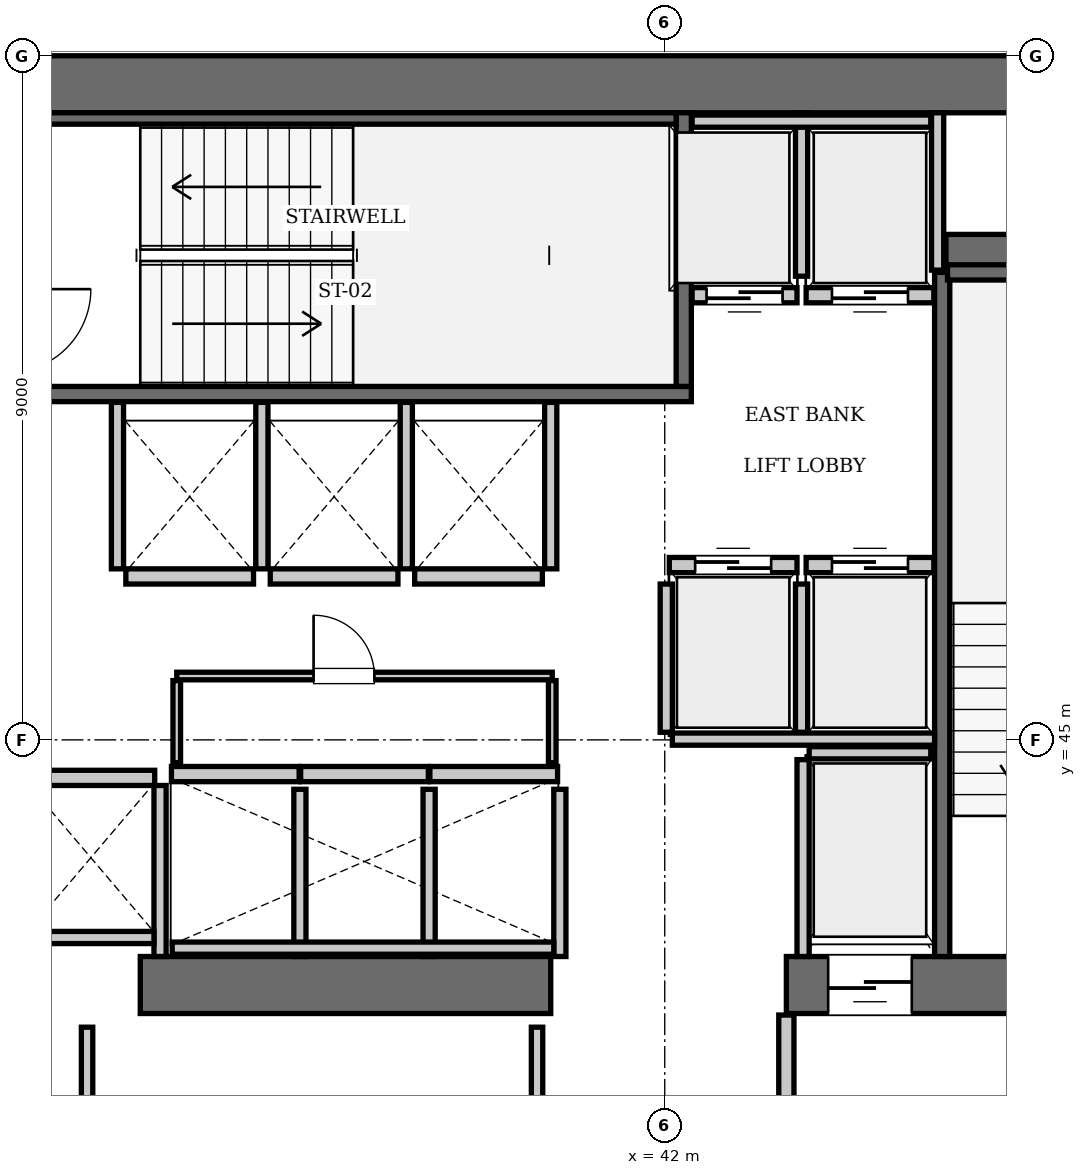
"""IFC4 building model, lengths in metres.
Left out: names, types, materials, properties, quantities, classifications, styles, units other than length and angle.
Written with IfcOpenShell. Run it as: python <this file> out.ifc"""

import sys

from ifc_helpers import new_model, si_unit, direction, frame, frame_2d, origin, place, context, subcontext, project, spatial, rectangle, extrude, element, fill, save


model = new_model("IFC4")
c1 = context("Model", 3, precision=1e-05, world=origin(), true_north=direction((0.0, 1.0)))
c2 = subcontext(c1, "Body", "Model", "MODEL_VIEW")
j1 = project(units=[si_unit("LENGTHUNIT", "METRE"), si_unit("PLANEANGLEUNIT", "RADIAN")], contexts=[c1])
p1 = place(None, origin())
s1 = spatial("IfcSite", under=j1, at=p1, CompositionType="ELEMENT")
p2 = place(p1, origin())
s2 = spatial("IfcBuilding", under=s1, at=p2, CompositionType="ELEMENT")
p3 = place(p2, frame((0.0, 0.0, 150.5)))
s3 = spatial("IfcBuildingStorey", under=s2, at=p3, CompositionType="ELEMENT", Elevation=150.5)
p4 = place(p3, frame((25.2, 53.625, 0.0), z_axis=(0.0, 0.0, 1.0), x_axis=(1.0, 0.0, 0.0)))
e1 = element("IfcWall", 1, at=p4, inside=s3, PredefinedType="SHEAR", context=c2, shape_type="SweptSolid", body=[
    extrude(rectangle(XDim=25.2, YDim=0.75, at=frame_2d((12.6, 0.0))), origin(), (0.0, 0.0, 1.0), 3.85),
])
p5 = place(p3, frame((35.1, 41.775, 0.0), z_axis=(0.0, 0.0, 1.0), x_axis=(1.0, 0.0, 0.0)))
e2 = element("IfcWall", 2, at=p5, inside=s3, PredefinedType="SHEAR", context=c2, shape_type="SweptSolid", body=[
    extrude(rectangle(XDim=5.4, YDim=0.75, at=frame_2d((2.7, 0.0))), origin(), (0.0, 0.0, 1.0), 3.85),
])
p6 = place(p3, frame((43.6, 41.775, 0.0), z_axis=(0.0, 0.0, 1.0), x_axis=(1.0, 0.0, 0.0)))
e3 = element("IfcWall", 3, at=p6, inside=s3, PredefinedType="SHEAR", context=c2, shape_type="SweptSolid", body=[
    extrude(rectangle(XDim=6.8, YDim=0.75, at=frame_2d((3.4, 0.0))), origin(), (0.0, 0.0, 1.0), 3.85),
])
p7 = place(p6, frame((3.9, 0.0, 0.0)))
e4 = element("IfcOpeningElement", 4, at=p7, cuts=e3, PredefinedType="OPENING", context=c2, shape_type="SweptSolid", body=[
    extrude(rectangle(XDim=1.15, YDim=2.15, at=frame_2d((0.575, 1.075))), frame((0.0, 0.385, 0.0), z_axis=(0.0, -1.0, 0.0), x_axis=(1.0, 0.0, 0.0)), (0.0, 0.0, 1.0), 0.77),
])
p8 = place(p6, frame((0.55, 0.0, 0.0)))
e5 = element("IfcOpeningElement", 5, at=p8, cuts=e3, PredefinedType="OPENING", context=c2, shape_type="SweptSolid", body=[
    extrude(rectangle(XDim=1.1, YDim=2.2, at=frame_2d((0.55, 1.1))), frame((0.0, 0.385, 0.0), z_axis=(0.0, -1.0, 0.0), x_axis=(1.0, 0.0, 0.0)), (0.0, 0.0, 1.0), 0.77),
])
p9 = place(p3, frame((45.7, 51.4, 0.0), z_axis=(0.0, 0.0, 1.0), x_axis=(1.0, 0.0, 0.0)))
e6 = element("IfcWall", 6, at=p9, inside=s3, PredefinedType="SHEAR", context=c2, shape_type="SweptSolid", body=[
    extrude(rectangle(XDim=3.95, YDim=0.5, at=frame_2d((1.975, 0.0))), origin(), (0.0, 0.0, 1.0), 3.85),
])
p10 = place(p3, frame((33.25, 49.55, 0.0), z_axis=(0.0, 0.0, 1.0), x_axis=(1.0, 0.0, 0.0)))
e7 = element("IfcWall", 7, at=p10, inside=s3, PredefinedType="SOLIDWALL", context=c2, shape_type="SweptSolid", body=[
    extrude(rectangle(XDim=9.1, YDim=0.2, at=frame_2d((4.55, 0.0))), origin(), (0.0, 0.0, 1.0), 3.61),
])
p11 = place(p3, frame((42.25, 49.65, 0.0), z_axis=(0.0, 0.0, 1.0), x_axis=(0.0, 1.0, 0.0)))
e8 = element("IfcWall", 8, at=p11, inside=s3, PredefinedType="SOLIDWALL", context=c2, shape_type="SweptSolid", body=[
    extrude(rectangle(XDim=3.6, YDim=0.2, at=frame_2d((1.8, 0.0))), origin(), (0.0, 0.0, 1.0), 3.61),
])
p12 = place(p3, frame((33.45, 53.175, 0.0), z_axis=(0.0, 0.0, 1.0), x_axis=(1.0, 0.0, 0.0)))
e9 = element("IfcWall", 9, at=p12, inside=s3, PredefinedType="SOLIDWALL", context=c2, shape_type="SweptSolid", body=[
    extrude(rectangle(XDim=8.7, YDim=0.15, at=frame_2d((4.35, 0.0))), origin(), (0.0, 0.0, 1.0), 3.61),
])
p13 = place(p3, frame((45.65, 42.15, 0.0), z_axis=(0.0, 0.0, 1.0), x_axis=(0.0, 1.0, 0.0)))
e10 = element("IfcWall", 10, at=p13, inside=s3, PredefinedType="SOLIDWALL", context=c2, shape_type="SweptSolid", body=[
    extrude(rectangle(XDim=9.0, YDim=0.2, at=frame_2d((4.5, 0.0))), origin(), (0.0, 0.0, 1.0), 3.61),
])
p14 = place(p3, frame((45.72, 51.15, 0.0), z_axis=(0.0, 0.0, 1.0), x_axis=(1.0, 0.0, 0.0)))
e11 = element("IfcWall", 11, at=p14, inside=s3, PredefinedType="SOLIDWALL", context=c2, shape_type="SweptSolid", body=[
    extrude(rectangle(XDim=3.5, YDim=0.2, at=frame_2d((1.75, 0.0))), origin(), (0.0, 0.0, 1.0), 3.61),
])
p15 = place(p3, frame((42.06, 47.3, 0.0), z_axis=(0.0, 0.0, 1.0), x_axis=(1.0, 0.0, 0.0)))
e12 = element("IfcWall", 12, at=p15, inside=s3, PredefinedType="SOLIDWALL", context=c2, shape_type="SweptSolid", body=[
    extrude(rectangle(XDim=1.68, YDim=0.2, at=frame_2d((0.84, 0.0))), origin(), (0.0, 0.0, 1.0), 3.61),
])
p16 = place(p15, frame((0.34, 0.0, 0.0)))
e13 = element("IfcOpeningElement", 13, at=p16, cuts=e12, PredefinedType="OPENING", context=c2, shape_type="SweptSolid", body=[
    extrude(rectangle(XDim=1.0, YDim=2.15, at=frame_2d((0.5, 1.075))), frame((0.0, 0.11, 0.0), z_axis=(0.0, -1.0, 0.0), x_axis=(1.0, 0.0, 0.0)), (0.0, 0.0, 1.0), 0.22),
])
p17 = place(p3, frame((43.86, 47.3, 0.0), z_axis=(0.0, 0.0, 1.0), x_axis=(1.0, 0.0, 0.0)))
e14 = element("IfcWall", 14, at=p17, inside=s3, PredefinedType="SOLIDWALL", context=c2, shape_type="SweptSolid", body=[
    extrude(rectangle(XDim=1.68, YDim=0.2, at=frame_2d((0.84, 0.0))), origin(), (0.0, 0.0, 1.0), 3.61),
])
p18 = place(p17, frame((0.34, 0.0, 0.0)))
e15 = element("IfcOpeningElement", 15, at=p18, cuts=e14, PredefinedType="OPENING", context=c2, shape_type="SweptSolid", body=[
    extrude(rectangle(XDim=1.0, YDim=2.15, at=frame_2d((0.5, 1.075))), frame((0.0, 0.11, 0.0), z_axis=(0.0, -1.0, 0.0), x_axis=(1.0, 0.0, 0.0)), (0.0, 0.0, 1.0), 0.22),
])
p19 = place(p3, frame((42.36, 50.85, 0.0), z_axis=(0.0, 0.0, 1.0), x_axis=(1.0, 0.0, 0.0)))
e16 = element("IfcWall", 16, at=p19, inside=s3, PredefinedType="SOLIDWALL", context=c2, shape_type="SweptSolid", body=[
    extrude(rectangle(XDim=1.38, YDim=0.2, at=frame_2d((0.69, 0.0))), origin(), (0.0, 0.0, 1.0), 3.61),
])
p20 = place(p19, frame((0.19, 0.0, 0.0)))
e17 = element("IfcOpeningElement", 17, at=p20, cuts=e16, PredefinedType="OPENING", context=c2, shape_type="SweptSolid", body=[
    extrude(rectangle(XDim=1.0, YDim=2.15, at=frame_2d((0.5, 1.075))), frame((0.0, 0.11, 0.0), z_axis=(0.0, -1.0, 0.0), x_axis=(1.0, 0.0, 0.0)), (0.0, 0.0, 1.0), 0.22),
])
p21 = place(p3, frame((43.86, 50.85, 0.0), z_axis=(0.0, 0.0, 1.0), x_axis=(1.0, 0.0, 0.0)))
e18 = element("IfcWall", 18, at=p21, inside=s3, PredefinedType="SOLIDWALL", context=c2, shape_type="SweptSolid", body=[
    extrude(rectangle(XDim=1.68, YDim=0.2, at=frame_2d((0.84, 0.0))), origin(), (0.0, 0.0, 1.0), 3.61),
])
p22 = place(p21, frame((0.34, 0.0, 0.0)))
e19 = element("IfcOpeningElement", 19, at=p22, cuts=e18, PredefinedType="OPENING", context=c2, shape_type="SweptSolid", body=[
    extrude(rectangle(XDim=1.0, YDim=2.15, at=frame_2d((0.5, 1.075))), frame((0.0, 0.11, 0.0), z_axis=(0.0, -1.0, 0.0), x_axis=(1.0, 0.0, 0.0)), (0.0, 0.0, 1.0), 0.22),
])
for number, where, z_axis, x_axis in (
    (20, (35.51, 44.55, 0.0), (0.0, 0.0, 1.0), (1.0, 0.0, 0.0)),
    (21, (37.21, 44.55, 0.0), (0.0, 0.0, 1.0), (1.0, 0.0, 0.0)),
):
    element("IfcWall", number, at=place(p3, frame(where, z_axis=z_axis, x_axis=x_axis)), inside=s3, PredefinedType="SOLIDWALL", context=c2, shape_type="SweptSolid", body=[
        extrude(rectangle(XDim=1.68, YDim=0.2, at=frame_2d((0.84, 0.0))), origin(), (0.0, 0.0, 1.0), 3.61),
    ])
for number, where, z_axis, x_axis in (
    (22, (38.91, 44.55, 0.0), (0.0, 0.0, 1.0), (1.0, 0.0, 0.0)),
    (23, (34.91, 47.15, 0.0), (0.0, 0.0, 1.0), (1.0, 0.0, 0.0)),
):
    element("IfcWall", number, at=place(p3, frame(where, z_axis=z_axis, x_axis=x_axis)), inside=s3, PredefinedType="SOLIDWALL", context=c2, shape_type="SweptSolid", body=[
        extrude(rectangle(XDim=1.68, YDim=0.2, at=frame_2d((0.84, 0.0))), origin(), (0.0, 0.0, 1.0), 3.61),
    ])
for number, where, z_axis, x_axis in (
    (24, (36.81, 47.15, 0.0), (0.0, 0.0, 1.0), (1.0, 0.0, 0.0)),
    (25, (38.71, 47.15, 0.0), (0.0, 0.0, 1.0), (1.0, 0.0, 0.0)),
    (26, (33.61, 44.5, 0.0), (0.0, 0.0, 1.0), (1.0, 0.0, 0.0)),
):
    element("IfcWall", number, at=place(p3, frame(where, z_axis=z_axis, x_axis=x_axis)), inside=s3, PredefinedType="SOLIDWALL", context=c2, shape_type="SweptSolid", body=[
        extrude(rectangle(XDim=1.68, YDim=0.2, at=frame_2d((0.84, 0.0))), origin(), (0.0, 0.0, 1.0), 3.61),
    ])
p23 = place(p3, frame((43.9, 44.83, 0.0), z_axis=(0.0, 0.0, 1.0), x_axis=(1.0, 0.0, 0.0)))
e27 = element("IfcWall", 27, at=p23, inside=s3, PredefinedType="SOLIDWALL", context=c2, shape_type="SweptSolid", body=[
    extrude(rectangle(XDim=1.6, YDim=0.16, at=frame_2d((0.8, 0.0))), origin(), (0.0, 0.0, 1.0), 3.61),
])
p24 = place(p3, frame((43.82, 42.15, 0.0), z_axis=(0.0, 0.0, 1.0), x_axis=(0.0, 1.0, 0.0)))
e28 = element("IfcWall", 28, at=p24, inside=s3, PredefinedType="SOLIDWALL", context=c2, shape_type="SweptSolid", body=[
    extrude(rectangle(XDim=2.59, YDim=0.16, at=frame_2d((1.295, 0.0))), origin(), (0.0, 0.0, 1.0), 3.61),
])
for number, where, z_axis, x_axis in (
    (29, (42.02, 45.1, 0.0), (0.0, 0.0, 1.0), (0.0, 1.0, 0.0)),
    (30, (43.8, 45.1, 0.0), (0.0, 0.0, 1.0), (0.0, 1.0, 0.0)),
):
    element("IfcWall", number, at=place(p3, frame(where, z_axis=z_axis, x_axis=x_axis)), inside=s3, PredefinedType="SOLIDWALL", context=c2, shape_type="SweptSolid", body=[
        extrude(rectangle(XDim=1.95, YDim=0.16, at=frame_2d((0.975, 0.0))), origin(), (0.0, 0.0, 1.0), 3.61),
    ])
p25 = place(p3, frame((42.1, 45.01, 0.0), z_axis=(0.0, 0.0, 1.0), x_axis=(1.0, 0.0, 0.0)))
e31 = element("IfcWall", 31, at=p25, inside=s3, PredefinedType="SOLIDWALL", context=c2, shape_type="SweptSolid", body=[
    extrude(rectangle(XDim=3.45, YDim=0.16, at=frame_2d((1.725, 0.0))), origin(), (0.0, 0.0, 1.0), 3.61),
])
p26 = place(p3, frame((45.59, 51.18, 0.0), z_axis=(0.0, 0.0, 1.0), x_axis=(0.0, 1.0, 0.0)))
e32 = element("IfcWall", 32, at=p26, inside=s3, PredefinedType="SOLIDWALL", context=c2, shape_type="SweptSolid", body=[
    extrude(rectangle(XDim=2.07, YDim=0.16, at=frame_2d((1.035, 0.0))), origin(), (0.0, 0.0, 1.0), 3.61),
])
p27 = place(p3, frame((43.8, 51.1, 0.0), z_axis=(0.0, 0.0, 1.0), x_axis=(0.0, 1.0, 0.0)))
e33 = element("IfcWall", 33, at=p27, inside=s3, PredefinedType="SOLIDWALL", context=c2, shape_type="SweptSolid", body=[
    extrude(rectangle(XDim=2.15, YDim=0.16, at=frame_2d((1.075, 0.0))), origin(), (0.0, 0.0, 1.0), 3.61),
])
p28 = place(p3, frame((42.36, 53.14, 0.0), z_axis=(0.0, 0.0, 1.0), x_axis=(1.0, 0.0, 0.0)))
e34 = element("IfcWall", 34, at=p28, inside=s3, PredefinedType="SOLIDWALL", context=c2, shape_type="SweptSolid", body=[
    extrude(rectangle(XDim=3.14, YDim=0.16, at=frame_2d((1.57, 0.0))), origin(), (0.0, 0.0, 1.0), 3.61),
])
for number, where, z_axis, x_axis in (
    (35, (37.2, 42.15, 0.0), (0.0, 0.0, 1.0), (0.0, 1.0, 0.0)),
    (36, (38.9, 42.15, 0.0), (0.0, 0.0, 1.0), (0.0, 1.0, 0.0)),
    (37, (40.62, 42.15, 0.0), (0.0, 0.0, 1.0), (0.0, 1.0, 0.0)),
):
    element("IfcWall", number, at=place(p3, frame(where, z_axis=z_axis, x_axis=x_axis)), inside=s3, PredefinedType="SOLIDWALL", context=c2, shape_type="SweptSolid", body=[
        extrude(rectangle(XDim=2.2, YDim=0.16, at=frame_2d((1.1, 0.0))), origin(), (0.0, 0.0, 1.0), 3.61),
    ])
p29 = place(p3, frame((35.52, 42.26, 0.0), z_axis=(0.0, 0.0, 1.0), x_axis=(1.0, 0.0, 0.0)))
e38 = element("IfcWall", 38, at=p29, inside=s3, PredefinedType="SOLIDWALL", context=c2, shape_type="SweptSolid", body=[
    extrude(rectangle(XDim=5.02, YDim=0.16, at=frame_2d((2.51, 0.0))), origin(), (0.0, 0.0, 1.0), 3.61),
])
for number, where, z_axis, x_axis in (
    (39, (34.8, 47.25, 0.0), (0.0, 0.0, 1.0), (0.0, 1.0, 0.0)),
    (40, (36.7, 47.25, 0.0), (0.0, 0.0, 1.0), (0.0, 1.0, 0.0)),
    (41, (38.6, 47.25, 0.0), (0.0, 0.0, 1.0), (0.0, 1.0, 0.0)),
    (42, (40.5, 47.25, 0.0), (0.0, 0.0, 1.0), (0.0, 1.0, 0.0)),
):
    element("IfcWall", number, at=place(p3, frame(where, z_axis=z_axis, x_axis=x_axis)), inside=s3, PredefinedType="SOLIDWALL", context=c2, shape_type="SweptSolid", body=[
        extrude(rectangle(XDim=2.19, YDim=0.16, at=frame_2d((1.095, 0.0))), origin(), (0.0, 0.0, 1.0), 3.61),
    ])
p30 = place(p3, frame((35.36, 42.15, 0.0), z_axis=(0.0, 0.0, 1.0), x_axis=(0.0, 1.0, 0.0)))
e43 = element("IfcWall", 43, at=p30, inside=s3, PredefinedType="SOLIDWALL", context=c2, shape_type="SweptSolid", body=[
    extrude(rectangle(XDim=2.25, YDim=0.16, at=frame_2d((1.125, 0.0))), origin(), (0.0, 0.0, 1.0), 3.61),
])
p31 = place(p3, frame((33.62, 42.4, 0.0), z_axis=(0.0, 0.0, 1.0), x_axis=(1.0, 0.0, 0.0)))
e44 = element("IfcWall", 44, at=p31, inside=s3, PredefinedType="SOLIDWALL", context=c2, shape_type="SweptSolid", body=[
    extrude(rectangle(XDim=1.66, YDim=0.16, at=frame_2d((0.83, 0.0))), origin(), (0.0, 0.0, 1.0), 3.61),
])
p32 = place(p3, frame((43.6, 38.31, 0.0), z_axis=(0.0, 0.0, 1.0), x_axis=(0.0, 1.0, 0.0)))
e45 = element("IfcWall", 45, at=p32, inside=s3, PredefinedType="PARTITIONING", context=c2, shape_type="SweptSolid", body=[
    extrude(rectangle(XDim=3.07, YDim=0.2, at=frame_2d((1.535, 0.0))), origin(), (0.0, 0.0, 1.0), 3.61),
])
p33 = place(p3, frame((35.58, 45.84, 0.0), z_axis=(0.0, 0.0, 1.0), x_axis=(1.0, 0.0, 0.0)))
e46 = element("IfcWall", 46, at=p33, inside=s3, PredefinedType="PARTITIONING", context=c2, shape_type="SweptSolid", body=[
    extrude(rectangle(XDim=4.94, YDim=0.1, at=frame_2d((2.47, 0.0))), origin(), (0.0, 0.0, 1.0), 3.61),
])
p34 = place(p33, frame((1.8, 0.0, 0.0)))
e47 = element("IfcOpeningElement", 47, at=p34, cuts=e46, PredefinedType="OPENING", context=c2, shape_type="SweptSolid", body=[
    extrude(rectangle(XDim=0.8, YDim=2.05, at=frame_2d((0.4, 1.025))), frame((0.0, 0.06, 0.0), z_axis=(0.0, -1.0, 0.0), x_axis=(1.0, 0.0, 0.0)), (0.0, 0.0, 1.0), 0.12),
])
for number, where, z_axis, x_axis in (
    (48, (35.58, 44.7, 0.0), (0.0, 0.0, 1.0), (0.0, 1.0, 0.0)),
    (49, (40.52, 44.7, 0.0), (0.0, 0.0, 1.0), (0.0, 1.0, 0.0)),
):
    element("IfcWall", number, at=place(p3, frame(where, z_axis=z_axis, x_axis=x_axis)), inside=s3, PredefinedType="PARTITIONING", context=c2, shape_type="SweptSolid", body=[
        extrude(rectangle(XDim=1.08, YDim=0.1, at=frame_2d((0.54, 0.0))), origin(), (0.0, 0.0, 1.0), 3.61),
    ])
for number, where, z_axis, x_axis in (
    (50, (34.4, 38.38, 0.0), (0.0, 0.0, 1.0), (0.0, 1.0, 0.0)),
    (51, (40.32, 38.38, 0.0), (0.0, 0.0, 1.0), (0.0, 1.0, 0.0)),
):
    element("IfcWall", number, at=place(p3, frame(where, z_axis=z_axis, x_axis=x_axis)), inside=s3, PredefinedType="PARTITIONING", context=c2, shape_type="SweptSolid", body=[
        extrude(rectangle(XDim=2.84, YDim=0.15, at=frame_2d((1.42, 0.0))), origin(), (0.0, 0.0, 1.0), 3.61),
    ])
p35 = place(p16, origin())
e52 = element("IfcDoor", 52, at=p35, inside=s3, OperationType="SLIDING_TO_LEFT", PredefinedType="DOOR", context=c2, shape_type="SweptSolid", body=[
    extrude(rectangle(XDim=1.0, YDim=2.15, at=frame_2d((0.5, 1.075))), frame((0.0, 0.025, 0.0), z_axis=(0.0, -1.0, 0.0), x_axis=(1.0, 0.0, 0.0)), (0.0, 0.0, 1.0), 0.05),
])
fill(e13, e52)
p36 = place(p18, origin())
e53 = element("IfcDoor", 53, at=p36, inside=s3, OperationType="SLIDING_TO_LEFT", PredefinedType="DOOR", context=c2, shape_type="SweptSolid", body=[
    extrude(rectangle(XDim=1.0, YDim=2.15, at=frame_2d((0.5, 1.075))), frame((0.0, 0.025, 0.0), z_axis=(0.0, -1.0, 0.0), x_axis=(1.0, 0.0, 0.0)), (0.0, 0.0, 1.0), 0.05),
])
fill(e15, e53)
p37 = place(p20, frame((1.0, 0.0, 0.0), z_axis=(0.0, 0.0, 1.0), x_axis=(-1.0, 0.0, 0.0)))
e54 = element("IfcDoor", 54, at=p37, inside=s3, OperationType="SLIDING_TO_LEFT", PredefinedType="DOOR", context=c2, shape_type="SweptSolid", body=[
    extrude(rectangle(XDim=1.0, YDim=2.15, at=frame_2d((0.5, 1.075))), frame((0.0, 0.025, 0.0), z_axis=(0.0, -1.0, 0.0), x_axis=(1.0, 0.0, 0.0)), (0.0, 0.0, 1.0), 0.05),
])
fill(e17, e54)
p38 = place(p22, frame((1.0, 0.0, 0.0), z_axis=(0.0, 0.0, 1.0), x_axis=(-1.0, 0.0, 0.0)))
e55 = element("IfcDoor", 55, at=p38, inside=s3, OperationType="SLIDING_TO_LEFT", PredefinedType="DOOR", context=c2, shape_type="SweptSolid", body=[
    extrude(rectangle(XDim=1.0, YDim=2.15, at=frame_2d((0.5, 1.075))), frame((0.0, 0.025, 0.0), z_axis=(0.0, -1.0, 0.0), x_axis=(1.0, 0.0, 0.0)), (0.0, 0.0, 1.0), 0.05),
])
fill(e19, e55)
p39 = place(p8, frame((1.1, 0.0, 0.0), z_axis=(0.0, 0.0, 1.0), x_axis=(-1.0, 0.0, 0.0)))
e56 = element("IfcDoor", 56, at=p39, inside=s3, OperationType="SLIDING_TO_LEFT", PredefinedType="DOOR", context=c2, shape_type="SweptSolid", body=[
    extrude(rectangle(XDim=1.1, YDim=2.2, at=frame_2d((0.55, 1.1))), frame((0.0, 0.025, 0.0), z_axis=(0.0, -1.0, 0.0), x_axis=(1.0, 0.0, 0.0)), (0.0, 0.0, 1.0), 0.05),
])
fill(e5, e56)
p40 = place(p34, origin())
e57 = element("IfcDoor", 57, at=p40, inside=s3, OperationType="SINGLE_SWING_LEFT", PredefinedType="DOOR", context=c2, shape_type="SweptSolid", body=[
    extrude(rectangle(XDim=0.8, YDim=2.05, at=frame_2d((0.4, 1.025))), frame((0.0, 0.025, 0.0), z_axis=(0.0, -1.0, 0.0), x_axis=(1.0, 0.0, 0.0)), (0.0, 0.0, 1.0), 0.05),
])
fill(e47, e57)
save(model, sys.argv[1])
